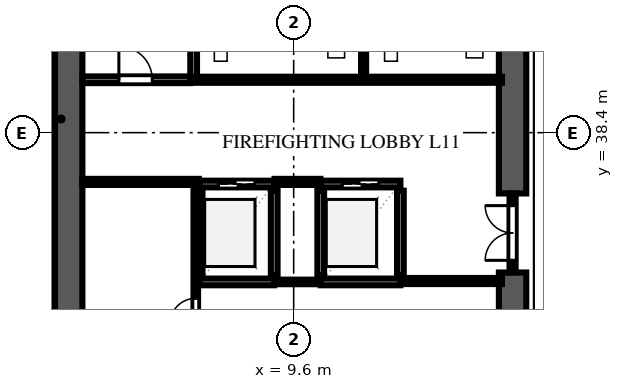
"""IFC4 building model, lengths in metres.
Left out: names, types, materials, properties, quantities, classifications, styles, units other than length and angle.
Written with IfcOpenShell. Run it as: python <this file> out.ifc"""

import sys

from ifc_helpers import new_model, si_unit, direction, frame, frame_2d, origin, place, context, subcontext, project, spatial, rectangle, extrude, element, fill, save


model = new_model("IFC4")
c1 = context("Model", 3, precision=1e-05, world=origin(), true_north=direction((0.0, 1.0)))
c2 = subcontext(c1, "Body", "Model", "MODEL_VIEW")
j1 = project(units=[si_unit("LENGTHUNIT", "METRE"), si_unit("PLANEANGLEUNIT", "RADIAN")], contexts=[c1])
p1 = place(None, origin())
s1 = spatial("IfcSite", under=j1, at=p1, CompositionType="ELEMENT")
p2 = place(p1, origin())
s2 = spatial("IfcBuilding", under=s1, at=p2, CompositionType="ELEMENT")
p3 = place(p2, frame((0.0, 0.0, 47.0)))
s3 = spatial("IfcBuildingStorey", under=s2, at=p3, CompositionType="ELEMENT", Elevation=47.0)
p4 = place(p3, frame((2.2, 9.15, 0.0), z_axis=(0.0, 0.0, 1.0), x_axis=(0.0, 1.0, 0.0)))
e1 = element("IfcWall", 1, at=p4, inside=s3, PredefinedType="SHEAR", context=c2, shape_type="SweptSolid", body=[
    extrude(rectangle(XDim=39.3, YDim=0.9, at=frame_2d((19.65, 0.0))), origin(), (0.0, 0.0, 1.0), 3.54),
])
p5 = place(p3, frame((16.8, 26.0, 0.0), z_axis=(0.0, 0.0, 1.0), x_axis=(0.0, 1.0, 0.0)))
e2 = element("IfcWall", 2, at=p5, inside=s3, PredefinedType="SHEAR", context=c2, shape_type="SweptSolid", body=[
    extrude(rectangle(XDim=7.8, YDim=0.9, at=frame_2d((3.9, 0.0))), origin(), (0.0, 0.0, 1.0), 3.54),
])
p6 = place(p3, frame((16.8, 36.4, 0.0), z_axis=(0.0, 0.0, 1.0), x_axis=(0.0, 1.0, 0.0)))
e3 = element("IfcWall", 3, at=p6, inside=s3, PredefinedType="SHEAR", context=c2, shape_type="SweptSolid", body=[
    extrude(rectangle(XDim=11.15, YDim=0.9, at=frame_2d((5.575, 0.0))), origin(), (0.0, 0.0, 1.0), 3.54),
])
p7 = place(p6, frame((9.2, 0.0, 0.0)))
e4 = element("IfcOpeningElement", 4, at=p7, cuts=e3, PredefinedType="OPENING", context=c2, shape_type="SweptSolid", body=[
    extrude(rectangle(XDim=0.95, YDim=2.15, at=frame_2d((0.475, 1.075))), frame((0.0, 0.462, 0.0), z_axis=(0.0, -1.0, 0.0), x_axis=(1.0, 0.0, 0.0)), (0.0, 0.0, 1.0), 0.924),
])
p8 = place(p3, frame((2.65, 40.14, 0.0), z_axis=(0.0, 0.0, 1.0), x_axis=(1.0, 0.0, 0.0)))
e5 = element("IfcWall", 5, at=p8, inside=s3, PredefinedType="SOLIDWALL", context=c2, shape_type="SweptSolid", body=[
    extrude(rectangle(XDim=3.55, YDim=0.22, at=frame_2d((1.775, 0.0))), origin(), (0.0, 0.0, 1.0), 3.54),
])
p9 = place(p8, frame((1.2, 0.0, 0.0)))
e6 = element("IfcOpeningElement", 6, at=p9, cuts=e5, PredefinedType="OPENING", context=c2, shape_type="SweptSolid", body=[
    extrude(rectangle(XDim=1.1, YDim=2.2, at=frame_2d((0.55, 1.1))), frame((0.0, 0.122, 0.0), z_axis=(0.0, -1.0, 0.0), x_axis=(1.0, 0.0, 0.0)), (0.0, 0.0, 1.0), 0.244),
])
p10 = place(p3, frame((6.31, 40.14, 0.0), z_axis=(0.0, 0.0, 1.0), x_axis=(0.0, 1.0, 0.0)))
e7 = element("IfcWall", 7, at=p10, inside=s3, PredefinedType="SOLIDWALL", context=c2, shape_type="SweptSolid", body=[
    extrude(rectangle(XDim=7.81, YDim=0.22, at=frame_2d((3.905, 0.0))), origin(), (0.0, 0.0, 1.0), 3.54),
])
for number, where, z_axis, x_axis in (
    (8, (6.49, 33.71, 0.0), (0.0, 0.0, 1.0), (0.0, 1.0, 0.0)),
    (9, (8.96, 33.71, 0.0), (0.0, 0.0, 1.0), (0.0, 1.0, 0.0)),
):
    element("IfcWall", number, at=place(p3, frame(where, z_axis=z_axis, x_axis=x_axis)), inside=s3, PredefinedType="SOLIDWALL", context=c2, shape_type="SweptSolid", body=[
        extrude(rectangle(XDim=2.78, YDim=0.22, at=frame_2d((1.39, 0.0))), origin(), (0.0, 0.0, 1.0), 3.54),
    ])
p11 = place(p3, frame((6.49, 33.49, 0.0), z_axis=(0.0, 0.0, 1.0), x_axis=(1.0, 0.0, 0.0)))
e10 = element("IfcWall", 10, at=p11, inside=s3, PredefinedType="SOLIDWALL", context=c2, shape_type="SweptSolid", body=[
    extrude(rectangle(XDim=2.47, YDim=0.22, at=frame_2d((1.235, 0.0))), origin(), (0.0, 0.0, 1.0), 3.54),
])
p12 = place(p3, frame((6.49, 36.71, 0.0), z_axis=(0.0, 0.0, 1.0), x_axis=(1.0, 0.0, 0.0)))
e11 = element("IfcWall", 11, at=p12, inside=s3, PredefinedType="SOLIDWALL", context=c2, shape_type="SweptSolid", body=[
    extrude(rectangle(XDim=2.47, YDim=0.22, at=frame_2d((1.235, 0.0))), origin(), (0.0, 0.0, 1.0), 3.54),
])
p13 = place(p12, frame((0.635, 0.0, 0.0)))
e12 = element("IfcOpeningElement", 12, at=p13, cuts=e11, PredefinedType="OPENING", context=c2, shape_type="SweptSolid", body=[
    extrude(rectangle(XDim=1.2, YDim=2.2, at=frame_2d((0.6, 1.1))), frame((0.0, 0.122, 0.0), z_axis=(0.0, -1.0, 0.0), x_axis=(1.0, 0.0, 0.0)), (0.0, 0.0, 1.0), 0.244),
])
for number, where, z_axis, x_axis in (
    (13, (10.49, 33.71, 0.0), (0.0, 0.0, 1.0), (0.0, 1.0, 0.0)),
    (14, (13.11, 33.71, 0.0), (0.0, 0.0, 1.0), (0.0, 1.0, 0.0)),
):
    element("IfcWall", number, at=place(p3, frame(where, z_axis=z_axis, x_axis=x_axis)), inside=s3, PredefinedType="SOLIDWALL", context=c2, shape_type="SweptSolid", body=[
        extrude(rectangle(XDim=2.78, YDim=0.22, at=frame_2d((1.39, 0.0))), origin(), (0.0, 0.0, 1.0), 3.54),
    ])
p14 = place(p3, frame((10.49, 33.49, 0.0), z_axis=(0.0, 0.0, 1.0), x_axis=(1.0, 0.0, 0.0)))
e15 = element("IfcWall", 15, at=p14, inside=s3, PredefinedType="SOLIDWALL", context=c2, shape_type="SweptSolid", body=[
    extrude(rectangle(XDim=2.62, YDim=0.22, at=frame_2d((1.31, 0.0))), origin(), (0.0, 0.0, 1.0), 3.54),
])
p15 = place(p3, frame((10.49, 36.71, 0.0), z_axis=(0.0, 0.0, 1.0), x_axis=(1.0, 0.0, 0.0)))
e16 = element("IfcWall", 16, at=p15, inside=s3, PredefinedType="SOLIDWALL", context=c2, shape_type="SweptSolid", body=[
    extrude(rectangle(XDim=2.62, YDim=0.22, at=frame_2d((1.31, 0.0))), origin(), (0.0, 0.0, 1.0), 3.54),
])
p16 = place(p15, frame((0.71, 0.0, 0.0)))
e17 = element("IfcOpeningElement", 17, at=p16, cuts=e16, PredefinedType="OPENING", context=c2, shape_type="SweptSolid", body=[
    extrude(rectangle(XDim=1.2, YDim=2.2, at=frame_2d((0.6, 1.1))), frame((0.0, 0.122, 0.0), z_axis=(0.0, -1.0, 0.0), x_axis=(1.0, 0.0, 0.0)), (0.0, 0.0, 1.0), 0.244),
])
p17 = place(p3, frame((2.65, 36.78, 0.0), z_axis=(0.0, 0.0, 1.0), x_axis=(1.0, 0.0, 0.0)))
e18 = element("IfcWall", 18, at=p17, inside=s3, PredefinedType="SOLIDWALL", context=c2, shape_type="SweptSolid", body=[
    extrude(rectangle(XDim=3.83, YDim=0.2, at=frame_2d((1.915, 0.0))), origin(), (0.0, 0.0, 1.0), 3.54),
])
p18 = place(p3, frame((8.97, 36.78, 0.0), z_axis=(0.0, 0.0, 1.0), x_axis=(1.0, 0.0, 0.0)))
e19 = element("IfcWall", 19, at=p18, inside=s3, PredefinedType="SOLIDWALL", context=c2, shape_type="SweptSolid", body=[
    extrude(rectangle(XDim=1.51, YDim=0.2, at=frame_2d((0.755, 0.0))), origin(), (0.0, 0.0, 1.0), 3.54),
])
p19 = place(p3, frame((13.12, 33.52, 0.0), z_axis=(0.0, 0.0, 1.0), x_axis=(1.0, 0.0, 0.0)))
e20 = element("IfcWall", 20, at=p19, inside=s3, PredefinedType="SOLIDWALL", context=c2, shape_type="SweptSolid", body=[
    extrude(rectangle(XDim=3.33, YDim=0.2, at=frame_2d((1.665, 0.0))), origin(), (0.0, 0.0, 1.0), 3.54),
])
p20 = place(p3, frame((6.32, 40.14, 0.0), z_axis=(0.0, 0.0, 1.0), x_axis=(1.0, 0.0, 0.0)))
e21 = element("IfcWall", 21, at=p20, inside=s3, PredefinedType="SOLIDWALL", context=c2, shape_type="SweptSolid", body=[
    extrude(rectangle(XDim=10.13, YDim=0.2, at=frame_2d((5.065, 0.0))), origin(), (0.0, 0.0, 1.0), 3.54),
])
p21 = place(p3, frame((16.8, 33.8, 0.0), z_axis=(0.0, 0.0, 1.0), x_axis=(0.0, 1.0, 0.0)))
e22 = element("IfcWall", 22, at=p21, inside=s3, PredefinedType="SOLIDWALL", context=c2, shape_type="SweptSolid", body=[
    extrude(rectangle(XDim=2.6, YDim=0.2, at=frame_2d((1.3, 0.0))), origin(), (0.0, 0.0, 1.0), 3.54),
])
p22 = place(p21, frame((0.4, 0.0, 0.0)))
e23 = element("IfcOpeningElement", 23, at=p22, cuts=e22, PredefinedType="OPENING", context=c2, shape_type="SweptSolid", body=[
    extrude(rectangle(XDim=1.8, YDim=2.2, at=frame_2d((0.9, 1.1))), frame((0.0, 0.112, 0.0), z_axis=(0.0, -1.0, 0.0), x_axis=(1.0, 0.0, 0.0)), (0.0, 0.0, 1.0), 0.224),
])
p23 = place(p3, frame((8.965, 33.49, 0.0), z_axis=(0.0, 0.0, 1.0), x_axis=(1.0, 0.0, 0.0)))
e24 = element("IfcWall", 24, at=p23, inside=s3, PredefinedType="PARTITIONING", context=c2, shape_type="SweptSolid", body=[
    extrude(rectangle(XDim=1.52, YDim=0.15, at=frame_2d((0.76, 0.0))), origin(), (0.0, 0.0, 1.0), 3.54),
])
p24 = place(p3, frame((6.38, 17.8, 0.0), z_axis=(0.0, 0.0, 1.0), x_axis=(0.0, 1.0, 0.0)))
e25 = element("IfcWall", 25, at=p24, inside=s3, PredefinedType="PARTITIONING", context=c2, shape_type="SweptSolid", body=[
    extrude(rectangle(XDim=18.98, YDim=0.15, at=frame_2d((9.49, 0.0))), origin(), (0.0, 0.0, 1.0), 3.54),
])
p25 = place(p24, frame((14.3, 0.0, 0.0)))
e26 = element("IfcOpeningElement", 26, at=p25, cuts=e25, PredefinedType="OPENING", context=c2, shape_type="SweptSolid", body=[
    extrude(rectangle(XDim=0.85, YDim=2.1, at=frame_2d((0.425, 1.05))), frame((0.0, 0.087, 0.0), z_axis=(0.0, -1.0, 0.0), x_axis=(1.0, 0.0, 0.0)), (0.0, 0.0, 1.0), 0.174),
])
p26 = place(p3, frame((11.9, 40.4, 0.0), z_axis=(0.0, 0.0, 1.0), x_axis=(0.0, 1.0, 0.0)))
e27 = element("IfcWall", 27, at=p26, inside=s3, PredefinedType="PLUMBINGWALL", context=c2, shape_type="SweptSolid", body=[
    extrude(rectangle(XDim=4.92, YDim=0.165, at=frame_2d((2.46, 0.0))), origin(), (0.0, 0.0, 1.0), 3.54),
])
p27 = place(p9, origin())
e28 = element("IfcDoor", 28, at=p27, inside=s3, OperationType="SINGLE_SWING_LEFT", PredefinedType="DOOR", context=c2, shape_type="SweptSolid", body=[
    extrude(rectangle(XDim=1.1, YDim=2.2, at=frame_2d((0.55, 1.1))), frame((0.0, 0.025, 0.0), z_axis=(0.0, -1.0, 0.0), x_axis=(1.0, 0.0, 0.0)), (0.0, 0.0, 1.0), 0.05),
])
fill(e6, e28)
p28 = place(p13, origin())
e29 = element("IfcDoor", 29, at=p28, inside=s3, OperationType="DOUBLE_DOOR_SLIDING", PredefinedType="DOOR", context=c2, shape_type="SweptSolid", body=[
    extrude(rectangle(XDim=1.2, YDim=2.2, at=frame_2d((0.6, 1.1))), frame((0.0, 0.025, 0.0), z_axis=(0.0, -1.0, 0.0), x_axis=(1.0, 0.0, 0.0)), (0.0, 0.0, 1.0), 0.05),
])
fill(e12, e29)
p29 = place(p16, origin())
e30 = element("IfcDoor", 30, at=p29, inside=s3, OperationType="DOUBLE_DOOR_SLIDING", PredefinedType="DOOR", context=c2, shape_type="SweptSolid", body=[
    extrude(rectangle(XDim=1.2, YDim=2.2, at=frame_2d((0.6, 1.1))), frame((0.0, 0.025, 0.0), z_axis=(0.0, -1.0, 0.0), x_axis=(1.0, 0.0, 0.0)), (0.0, 0.0, 1.0), 0.05),
])
fill(e17, e30)
p30 = place(p22, origin())
e31 = element("IfcDoor", 31, at=p30, inside=s3, OperationType="DOUBLE_DOOR_SINGLE_SWING", PredefinedType="DOOR", context=c2, shape_type="SweptSolid", body=[
    extrude(rectangle(XDim=1.8, YDim=2.2, at=frame_2d((0.9, 1.1))), frame((0.0, 0.025, 0.0), z_axis=(0.0, -1.0, 0.0), x_axis=(1.0, 0.0, 0.0)), (0.0, 0.0, 1.0), 0.05),
])
fill(e23, e31)
p31 = place(p25, origin())
e32 = element("IfcDoor", 32, at=p31, inside=s3, OperationType="SINGLE_SWING_LEFT", PredefinedType="DOOR", context=c2, shape_type="SweptSolid", body=[
    extrude(rectangle(XDim=0.85, YDim=2.1, at=frame_2d((0.425, 1.05))), frame((0.0, 0.025, 0.0), z_axis=(0.0, -1.0, 0.0), x_axis=(1.0, 0.0, 0.0)), (0.0, 0.0, 1.0), 0.05),
])
fill(e26, e32)
save(model, sys.argv[1])
